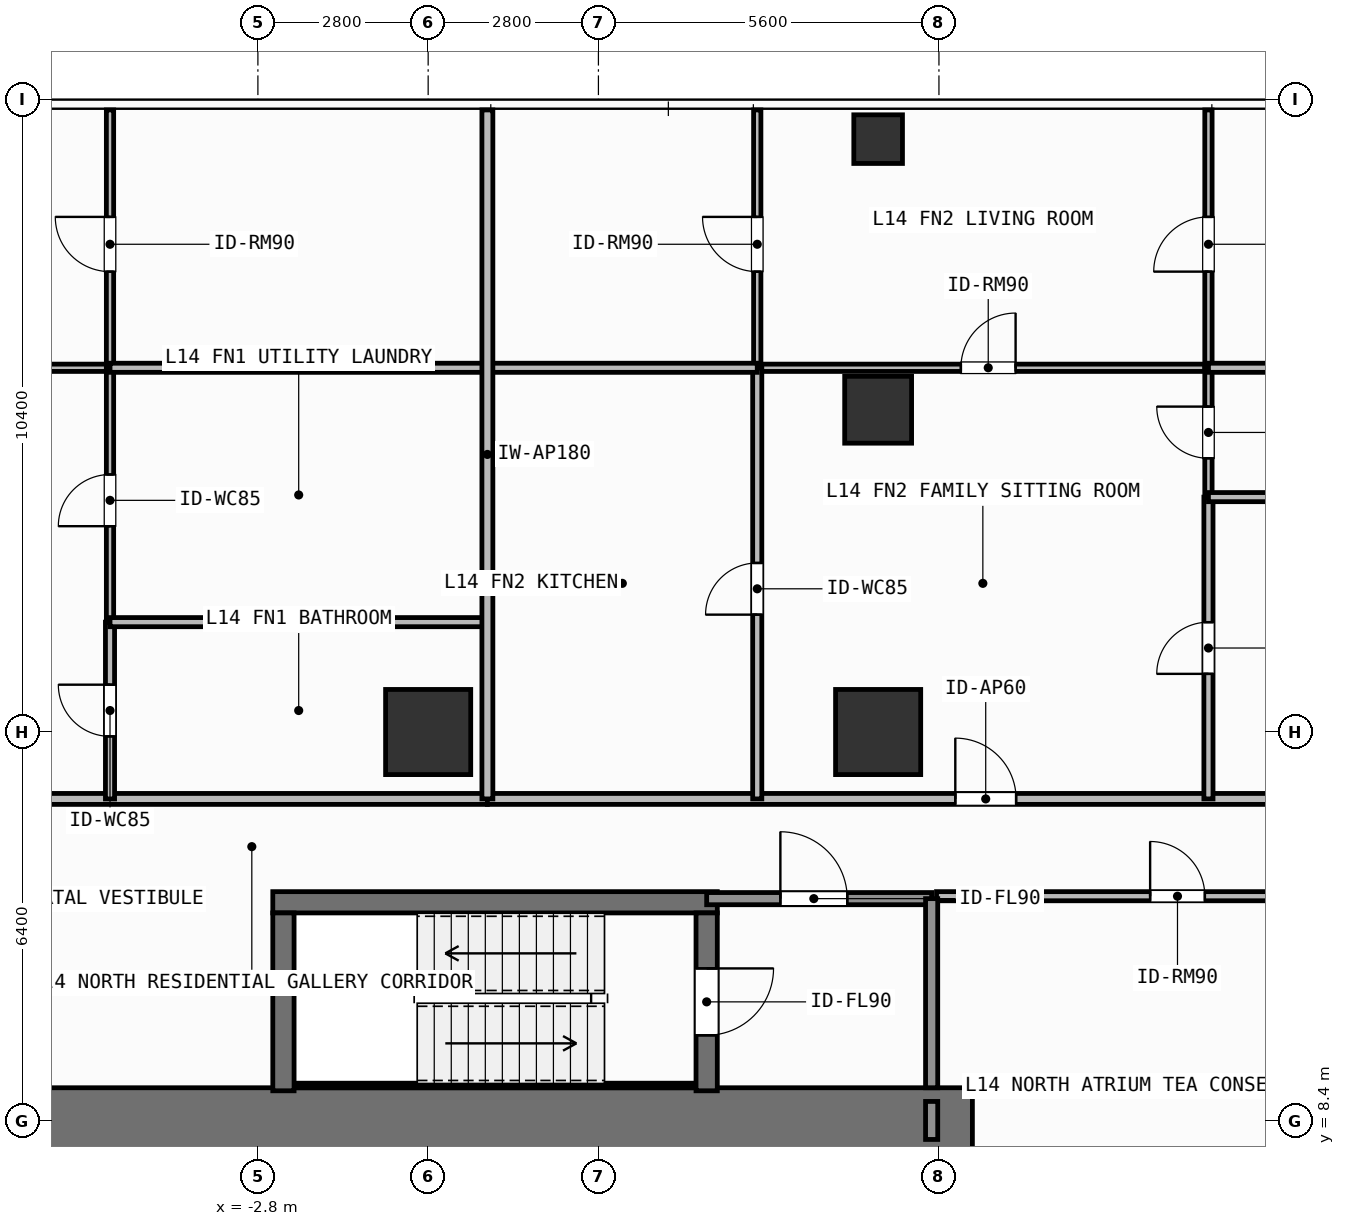
"""IFC4 building model, lengths in metres.
Left out: names, types, materials, properties, quantities, classifications, styles, units other than length and angle.
Written with IfcOpenShell. Run it as: python <this file> out.ifc"""

import sys

from ifc_helpers import new_model, si_unit, direction, frame, frame_2d, origin, origin_2d, place, context, subcontext, project, spatial, rectangle, hollow_rectangle, extrude, element, fill, save


model = new_model("IFC4")
c1 = context("Model", 3, precision=1e-05, world=origin(), true_north=direction((0.0, 1.0)))
c2 = subcontext(c1, "Body", "Model", "MODEL_VIEW")
j1 = project(units=[si_unit("LENGTHUNIT", "METRE"), si_unit("PLANEANGLEUNIT", "RADIAN")], contexts=[c1])
p1 = place(None, origin())
s1 = spatial("IfcSite", under=j1, at=p1, CompositionType="ELEMENT")
p2 = place(p1, origin())
s2 = spatial("IfcBuilding", under=s1, at=p2, CompositionType="ELEMENT")
p3 = place(p2, frame((0.0, 0.0, 54.0)))
s3 = spatial("IfcBuildingStorey", under=s2, at=p3, CompositionType="ELEMENT", Elevation=54.0)
p4 = place(p3, frame((-7.55, 8.4, 0.0), z_axis=(0.0, 0.0, 1.0), x_axis=(1.0, 0.0, 0.0)))
e1 = element("IfcWall", 1, at=p4, inside=s3, PredefinedType="SHEAR", context=c2, shape_type="SweptSolid", body=[
    extrude(rectangle(XDim=16.5, YDim=1.1, at=frame_2d((8.25, 0.0))), origin(), (0.0, 0.0, 1.0), 3.9),
])
p5 = place(p3, frame((-2.555, 12.0, 0.0), z_axis=(0.0, 0.0, 1.0), x_axis=(1.0, 0.0, 0.0)))
e2 = element("IfcWall", 2, at=p5, inside=s3, PredefinedType="SHEAR", context=c2, shape_type="SweptSolid", body=[
    extrude(rectangle(XDim=7.31, YDim=0.35, at=frame_2d((3.655, 0.0))), origin(), (0.0, 0.0, 1.0), 3.9),
])
p6 = place(p3, frame((-2.2, 8.988, 0.0), z_axis=(0.0, 0.0, 1.0), x_axis=(1.0, 0.0, 0.0)))
e3 = element("IfcWall", 3, at=p6, inside=s3, PredefinedType="SHEAR", context=c2, shape_type="SweptSolid", body=[
    extrude(rectangle(XDim=6.6, YDim=0.075, at=frame_2d((3.3, 0.0))), origin(), (0.0, 0.0, 1.0), 3.9),
])
p7 = place(p3, frame((-2.38, 8.9, 0.0), z_axis=(0.0, 0.0, 1.0), x_axis=(0.0, 1.0, 0.0)))
e4 = element("IfcWall", 4, at=p7, inside=s3, PredefinedType="SHEAR", context=c2, shape_type="SweptSolid", body=[
    extrude(rectangle(XDim=2.925, YDim=0.35, at=frame_2d((1.462, 0.0))), origin(), (0.0, 0.0, 1.0), 3.9),
])
p8 = place(p3, frame((4.58, 11.825, 0.0), z_axis=(0.0, 0.0, 1.0), x_axis=(0.0, -1.0, 0.0)))
e5 = element("IfcWall", 5, at=p8, inside=s3, PredefinedType="SHEAR", context=c2, shape_type="SweptSolid", body=[
    extrude(rectangle(XDim=2.925, YDim=0.35, at=frame_2d((1.462, 0.0))), origin(), (0.0, 0.0, 1.0), 3.9),
])
p9 = place(p8, frame((0.913, 0.0, 0.0)))
e6 = element("IfcOpeningElement", 6, at=p9, cuts=e5, PredefinedType="OPENING", context=c2, shape_type="SweptSolid", body=[
    extrude(rectangle(XDim=1.1, YDim=2.15, at=frame_2d((0.55, 1.075))), frame((0.0, 0.185, 0.0), z_axis=(0.0, -1.0, 0.0), x_axis=(1.0, 0.0, 0.0)), (0.0, 0.0, 1.0), 0.37),
])
for number, where, z_axis, x_axis in (
    (7, (0.0, 14.8, 0.0), (0.0, 0.0, 1.0), (1.0, 0.0, 0.0)),
    (8, (7.4, 14.8, 0.0), (0.0, 0.0, 1.0), (1.0, 0.0, 0.0)),
):
    element("IfcColumn", number, at=place(p3, frame(where, z_axis=z_axis, x_axis=x_axis)), inside=s3, PredefinedType="COLUMN", context=c2, shape_type="SweptSolid", body=[
        extrude(rectangle(XDim=1.4, YDim=1.4, at=origin_2d()), origin(), (0.0, 0.0, 1.0), 3.9),
    ])
p10 = place(p3, frame((7.4, 20.1, 0.0), z_axis=(0.0, 0.0, 1.0), x_axis=(1.0, 0.0, 0.0)))
e9 = element("IfcColumn", 9, at=p10, inside=s3, PredefinedType="COLUMN", context=c2, shape_type="SweptSolid", body=[
    extrude(rectangle(XDim=1.1, YDim=1.1, at=origin_2d()), origin(), (0.0, 0.0, 1.0), 3.9),
])
p11 = place(p3, frame((7.4, 24.55, 0.0), z_axis=(0.0, 0.0, 1.0), x_axis=(1.0, 0.0, 0.0)))
e10 = element("IfcColumn", 10, at=p11, inside=s3, PredefinedType="COLUMN", context=c2, shape_type="SweptSolid", body=[
    extrude(hollow_rectangle(XDim=0.8, YDim=0.8, WallThickness=0.036, at=origin_2d()), origin(), (0.0, 0.0, 1.0), 3.9),
])
p12 = place(p3, frame((4.58, 12.06, 0.0), z_axis=(0.0, 0.0, 1.0), x_axis=(1.0, 0.0, 0.0)))
e11 = element("IfcWall", 11, at=p12, inside=s3, PredefinedType="SOLIDWALL", context=c2, shape_type="SweptSolid", body=[
    extrude(rectangle(XDim=3.7, YDim=0.2, at=frame_2d((1.85, 0.0))), origin(), (0.0, 0.0, 1.0), 3.68),
])
p13 = place(p12, frame((1.212, 0.0, 0.0)))
e12 = element("IfcOpeningElement", 12, at=p13, cuts=e11, PredefinedType="OPENING", context=c2, shape_type="SweptSolid", body=[
    extrude(rectangle(XDim=1.1, YDim=2.15, at=frame_2d((0.55, 1.075))), frame((0.0, 0.11, 0.0), z_axis=(0.0, -1.0, 0.0), x_axis=(1.0, 0.0, 0.0)), (0.0, 0.0, 1.0), 0.22),
])
p14 = place(p3, frame((8.36, 12.1, 0.0), z_axis=(0.0, 0.0, 1.0), x_axis=(1.0, 0.0, 0.0)))
e13 = element("IfcWall", 13, at=p14, inside=s3, PredefinedType="PARTITIONING", context=c2, shape_type="SweptSolid", body=[
    extrude(rectangle(XDim=7.22, YDim=0.15, at=frame_2d((3.61, 0.0))), origin(), (0.0, 0.0, 1.0), 3.68),
])
p15 = place(p14, frame((3.513, 0.0, 0.0)))
e14 = element("IfcOpeningElement", 14, at=p15, cuts=e13, PredefinedType="OPENING", context=c2, shape_type="SweptSolid", body=[
    extrude(rectangle(XDim=0.9, YDim=2.1, at=frame_2d((0.45, 1.05))), frame((0.0, 0.085, 0.0), z_axis=(0.0, -1.0, 0.0), x_axis=(1.0, 0.0, 0.0)), (0.0, 0.0, 1.0), 0.17),
])
p16 = place(p3, frame((-24.42, 13.7, 0.0), z_axis=(0.0, 0.0, 1.0), x_axis=(1.0, 0.0, 0.0)))
e15 = element("IfcWall", 15, at=p16, inside=s3, PredefinedType="PARTITIONING", context=c2, shape_type="SweptSolid", body=[
    extrude(rectangle(XDim=25.394, YDim=0.18, at=frame_2d((12.697, 0.0))), origin(), (0.0, 0.0, 1.0), 3.68),
])
p17 = place(p16, frame((10.4, 0.0, 0.0)))
e16 = element("IfcOpeningElement", 16, at=p17, cuts=e15, PredefinedType="OPENING", context=c2, shape_type="SweptSolid", body=[
    extrude(rectangle(XDim=1.0, YDim=2.2, at=frame_2d((0.5, 1.1))), frame((0.0, 0.1, 0.0), z_axis=(0.0, -1.0, 0.0), x_axis=(1.0, 0.0, 0.0)), (0.0, 0.0, 1.0), 0.2),
])
p18 = place(p3, frame((-12.805, 20.79, 0.0), z_axis=(0.0, 0.0, 1.0), x_axis=(1.0, 0.0, 0.0)))
e17 = element("IfcWall", 17, at=p18, inside=s3, PredefinedType="PARTITIONING", context=c2, shape_type="SweptSolid", body=[
    extrude(rectangle(XDim=7.573, YDim=0.12, at=frame_2d((3.787, 0.0))), origin(), (0.0, 0.0, 1.0), 3.68),
])
p19 = place(p18, frame((3.336, 0.0, 0.0)))
e18 = element("IfcOpeningElement", 18, at=p19, cuts=e17, PredefinedType="OPENING", context=c2, shape_type="SweptSolid", body=[
    extrude(rectangle(XDim=0.9, YDim=2.1, at=frame_2d((0.45, 1.05))), frame((0.0, 0.07, 0.0), z_axis=(0.0, -1.0, 0.0), x_axis=(1.0, 0.0, 0.0)), (0.0, 0.0, 1.0), 0.14),
])
p20 = place(p3, frame((-5.232, 13.7, 0.0), z_axis=(0.0, 0.0, 1.0), x_axis=(0.0, 1.0, 0.0)))
e19 = element("IfcWall", 19, at=p20, inside=s3, PredefinedType="PARTITIONING", context=c2, shape_type="SweptSolid", body=[
    extrude(rectangle(XDim=2.907, YDim=0.15, at=frame_2d((1.454, 0.0))), origin(), (0.0, 0.0, 1.0), 3.68),
])
p21 = place(p20, frame((1.029, 0.0, 0.0)))
e20 = element("IfcOpeningElement", 20, at=p21, cuts=e19, PredefinedType="OPENING", context=c2, shape_type="SweptSolid", body=[
    extrude(rectangle(XDim=0.85, YDim=2.1, at=frame_2d((0.425, 1.05))), frame((0.0, 0.085, 0.0), z_axis=(0.0, -1.0, 0.0), x_axis=(1.0, 0.0, 0.0)), (0.0, 0.0, 1.0), 0.17),
])
p22 = place(p3, frame((-5.232, 16.607, 0.0), z_axis=(0.0, 0.0, 1.0), x_axis=(0.0, 1.0, 0.0)))
e21 = element("IfcWall", 21, at=p22, inside=s3, PredefinedType="PARTITIONING", context=c2, shape_type="SweptSolid", body=[
    extrude(rectangle(XDim=4.183, YDim=0.12, at=frame_2d((2.092, 0.0))), origin(), (0.0, 0.0, 1.0), 3.68),
])
p23 = place(p22, frame((1.578, 0.0, 0.0)))
e22 = element("IfcOpeningElement", 22, at=p23, cuts=e21, PredefinedType="OPENING", context=c2, shape_type="SweptSolid", body=[
    extrude(rectangle(XDim=0.85, YDim=2.1, at=frame_2d((0.425, 1.05))), frame((0.0, 0.07, 0.0), z_axis=(0.0, -1.0, 0.0), x_axis=(1.0, 0.0, 0.0)), (0.0, 0.0, 1.0), 0.14),
])
p24 = place(p3, frame((-5.232, 20.79, 0.0), z_axis=(0.0, 0.0, 1.0), x_axis=(0.0, 1.0, 0.0)))
e23 = element("IfcWall", 23, at=p24, inside=s3, PredefinedType="PARTITIONING", context=c2, shape_type="SweptSolid", body=[
    extrude(rectangle(XDim=4.24, YDim=0.12, at=frame_2d((2.12, 0.0))), origin(), (0.0, 0.0, 1.0), 3.68),
])
p25 = place(p24, frame((1.581, 0.0, 0.0)))
e24 = element("IfcOpeningElement", 24, at=p25, cuts=e23, PredefinedType="OPENING", context=c2, shape_type="SweptSolid", body=[
    extrude(rectangle(XDim=0.9, YDim=2.1, at=frame_2d((0.45, 1.05))), frame((0.0, 0.07, 0.0), z_axis=(0.0, -1.0, 0.0), x_axis=(1.0, 0.0, 0.0)), (0.0, 0.0, 1.0), 0.14),
])
p26 = place(p3, frame((0.974, 13.7, 0.0), z_axis=(0.0, 0.0, 1.0), x_axis=(1.0, 0.0, 0.0)))
e25 = element("IfcWall", 25, at=p26, inside=s3, PredefinedType="PARTITIONING", context=c2, shape_type="SweptSolid", body=[
    extrude(rectangle(XDim=17.646, YDim=0.18, at=frame_2d((8.823, 0.0))), origin(), (0.0, 0.0, 1.0), 3.68),
])
p27 = place(p26, frame((7.695, 0.0, 0.0)))
e26 = element("IfcOpeningElement", 26, at=p27, cuts=e25, PredefinedType="OPENING", context=c2, shape_type="SweptSolid", body=[
    extrude(rectangle(XDim=1.0, YDim=2.2, at=frame_2d((0.5, 1.1))), frame((0.0, 0.1, 0.0), z_axis=(0.0, -1.0, 0.0), x_axis=(1.0, 0.0, 0.0)), (0.0, 0.0, 1.0), 0.2),
])
p28 = place(p3, frame((5.412, 20.79, 0.0), z_axis=(0.0, 0.0, 1.0), x_axis=(1.0, 0.0, 0.0)))
e27 = element("IfcWall", 27, at=p28, inside=s3, PredefinedType="PARTITIONING", context=c2, shape_type="SweptSolid", body=[
    extrude(rectangle(XDim=7.42, YDim=0.12, at=frame_2d((3.71, 0.0))), origin(), (0.0, 0.0, 1.0), 3.68),
])
p29 = place(p28, frame((3.349, 0.0, 0.0)))
e28 = element("IfcOpeningElement", 28, at=p29, cuts=e27, PredefinedType="OPENING", context=c2, shape_type="SweptSolid", body=[
    extrude(rectangle(XDim=0.9, YDim=2.1, at=frame_2d((0.45, 1.05))), frame((0.0, 0.07, 0.0), z_axis=(0.0, -1.0, 0.0), x_axis=(1.0, 0.0, 0.0)), (0.0, 0.0, 1.0), 0.14),
])
p30 = place(p3, frame((5.412, 13.7, 0.0), z_axis=(0.0, 0.0, 1.0), x_axis=(0.0, 1.0, 0.0)))
e29 = element("IfcWall", 29, at=p30, inside=s3, PredefinedType="PARTITIONING", context=c2, shape_type="SweptSolid", body=[
    extrude(rectangle(XDim=7.09, YDim=0.15, at=frame_2d((3.545, 0.0))), origin(), (0.0, 0.0, 1.0), 3.68),
])
p31 = place(p30, frame((3.03, 0.0, 0.0)))
e30 = element("IfcOpeningElement", 30, at=p31, cuts=e29, PredefinedType="OPENING", context=c2, shape_type="SweptSolid", body=[
    extrude(rectangle(XDim=0.85, YDim=2.1, at=frame_2d((0.425, 1.05))), frame((0.0, 0.085, 0.0), z_axis=(0.0, -1.0, 0.0), x_axis=(1.0, 0.0, 0.0)), (0.0, 0.0, 1.0), 0.17),
])
p32 = place(p3, frame((5.412, 20.79, 0.0), z_axis=(0.0, 0.0, 1.0), x_axis=(0.0, 1.0, 0.0)))
e31 = element("IfcWall", 31, at=p32, inside=s3, PredefinedType="PARTITIONING", context=c2, shape_type="SweptSolid", body=[
    extrude(rectangle(XDim=4.24, YDim=0.12, at=frame_2d((2.12, 0.0))), origin(), (0.0, 0.0, 1.0), 3.68),
])
p33 = place(p32, frame((1.581, 0.0, 0.0)))
e32 = element("IfcOpeningElement", 32, at=p33, cuts=e31, PredefinedType="OPENING", context=c2, shape_type="SweptSolid", body=[
    extrude(rectangle(XDim=0.9, YDim=2.1, at=frame_2d((0.45, 1.05))), frame((0.0, 0.07, 0.0), z_axis=(0.0, -1.0, 0.0), x_axis=(1.0, 0.0, 0.0)), (0.0, 0.0, 1.0), 0.14),
])
p34 = place(p3, frame((12.832, 13.7, 0.0), z_axis=(0.0, 0.0, 1.0), x_axis=(0.0, 1.0, 0.0)))
e33 = element("IfcWall", 33, at=p34, inside=s3, PredefinedType="PARTITIONING", context=c2, shape_type="SweptSolid", body=[
    extrude(rectangle(XDim=4.963, YDim=0.15, at=frame_2d((2.481, 0.0))), origin(), (0.0, 0.0, 1.0), 3.68),
])
p35 = place(p34, frame((2.056, 0.0, 0.0)))
e34 = element("IfcOpeningElement", 34, at=p35, cuts=e33, PredefinedType="OPENING", context=c2, shape_type="SweptSolid", body=[
    extrude(rectangle(XDim=0.85, YDim=2.1, at=frame_2d((0.425, 1.05))), frame((0.0, 0.085, 0.0), z_axis=(0.0, -1.0, 0.0), x_axis=(1.0, 0.0, 0.0)), (0.0, 0.0, 1.0), 0.17),
])
p36 = place(p3, frame((12.832, 18.663, 0.0), z_axis=(0.0, 0.0, 1.0), x_axis=(0.0, 1.0, 0.0)))
e35 = element("IfcWall", 35, at=p36, inside=s3, PredefinedType="PARTITIONING", context=c2, shape_type="SweptSolid", body=[
    extrude(rectangle(XDim=2.127, YDim=0.12, at=frame_2d((1.063, 0.0))), origin(), (0.0, 0.0, 1.0), 3.68),
])
p37 = place(p36, frame((0.638, 0.0, 0.0)))
e36 = element("IfcOpeningElement", 36, at=p37, cuts=e35, PredefinedType="OPENING", context=c2, shape_type="SweptSolid", body=[
    extrude(rectangle(XDim=0.85, YDim=2.1, at=frame_2d((0.425, 1.05))), frame((0.0, 0.07, 0.0), z_axis=(0.0, -1.0, 0.0), x_axis=(1.0, 0.0, 0.0)), (0.0, 0.0, 1.0), 0.14),
])
p38 = place(p3, frame((12.832, 20.79, 0.0), z_axis=(0.0, 0.0, 1.0), x_axis=(0.0, 1.0, 0.0)))
e37 = element("IfcWall", 37, at=p38, inside=s3, PredefinedType="PARTITIONING", context=c2, shape_type="SweptSolid", body=[
    extrude(rectangle(XDim=4.24, YDim=0.12, at=frame_2d((2.12, 0.0))), origin(), (0.0, 0.0, 1.0), 3.68),
])
p39 = place(p38, frame((1.581, 0.0, 0.0)))
e38 = element("IfcOpeningElement", 38, at=p39, cuts=e37, PredefinedType="OPENING", context=c2, shape_type="SweptSolid", body=[
    extrude(rectangle(XDim=0.9, YDim=2.1, at=frame_2d((0.45, 1.05))), frame((0.0, 0.07, 0.0), z_axis=(0.0, -1.0, 0.0), x_axis=(1.0, 0.0, 0.0)), (0.0, 0.0, 1.0), 0.14),
])
p40 = place(p3, frame((8.28, 8.95, 0.0), z_axis=(0.0, 0.0, 1.0), x_axis=(0.0, 1.0, 0.0)))
e39 = element("IfcWall", 39, at=p40, inside=s3, PredefinedType="SOLIDWALL", context=c2, shape_type="SweptSolid", body=[
    extrude(rectangle(XDim=3.11, YDim=0.2, at=frame_2d((1.555, 0.0))), origin(), (0.0, 0.0, 1.0), 3.68),
])
p41 = place(p3, frame((8.28, 8.1, 0.0), z_axis=(0.0, 0.0, 1.0), x_axis=(0.0, 1.0, 0.0)))
e40 = element("IfcWall", 40, at=p41, inside=s3, PredefinedType="SOLIDWALL", context=c2, shape_type="SweptSolid", body=[
    extrude(rectangle(XDim=0.625, YDim=0.2, at=frame_2d((0.312, 0.0))), origin(), (0.0, 0.0, 1.0), 3.68),
])
for number, where, z_axis, x_axis in (
    (41, (-5.232, 16.607, 0.0), (0.0, 0.0, 1.0), (1.0, 0.0, 0.0)),
    (42, (-5.232, 20.79, 0.0), (0.0, 0.0, 1.0), (1.0, 0.0, 0.0)),
):
    element("IfcWall", number, at=place(p3, frame(where, z_axis=z_axis, x_axis=x_axis)), inside=s3, PredefinedType="PARTITIONING", context=c2, shape_type="SweptSolid", body=[
        extrude(rectangle(XDim=6.206, YDim=0.15, at=frame_2d((3.103, 0.0))), origin(), (0.0, 0.0, 1.0), 3.68),
    ])
p42 = place(p3, frame((0.974, 20.79, 0.0), z_axis=(0.0, 0.0, 1.0), x_axis=(1.0, 0.0, 0.0)))
e43 = element("IfcWall", 43, at=p42, inside=s3, PredefinedType="PARTITIONING", context=c2, shape_type="SweptSolid", body=[
    extrude(rectangle(XDim=4.438, YDim=0.15, at=frame_2d((2.219, 0.0))), origin(), (0.0, 0.0, 1.0), 3.68),
])
for number, where, z_axis, x_axis in (
    (44, (12.832, 18.663, 0.0), (0.0, 0.0, 1.0), (1.0, 0.0, 0.0)),
    (45, (12.832, 20.79, 0.0), (0.0, 0.0, 1.0), (1.0, 0.0, 0.0)),
):
    element("IfcWall", number, at=place(p3, frame(where, z_axis=z_axis, x_axis=x_axis)), inside=s3, PredefinedType="PARTITIONING", context=c2, shape_type="SweptSolid", body=[
        extrude(rectangle(XDim=5.788, YDim=0.15, at=frame_2d((2.894, 0.0))), origin(), (0.0, 0.0, 1.0), 3.68),
    ])
p43 = place(p3, frame((0.974, 13.7, 0.0), z_axis=(0.0, 0.0, 1.0), x_axis=(0.0, 1.0, 0.0)))
e46 = element("IfcWall", 46, at=p43, inside=s3, PredefinedType="PARTITIONING", context=c2, shape_type="SweptSolid", body=[
    extrude(rectangle(XDim=11.33, YDim=0.18, at=frame_2d((5.665, 0.0))), origin(), (0.0, 0.0, 1.0), 3.68),
])
p44 = place(p9, origin())
e47 = element("IfcDoor", 47, at=p44, inside=s3, OperationType="SINGLE_SWING_LEFT", PredefinedType="DOOR", context=c2, shape_type="SweptSolid", body=[
    extrude(rectangle(XDim=1.1, YDim=2.15, at=frame_2d((0.55, 1.075))), frame((0.0, 0.025, 0.0), z_axis=(0.0, -1.0, 0.0), x_axis=(1.0, 0.0, 0.0)), (0.0, 0.0, 1.0), 0.05),
])
fill(e6, e47)
p45 = place(p13, origin())
e48 = element("IfcDoor", 48, at=p45, inside=s3, OperationType="SINGLE_SWING_LEFT", PredefinedType="DOOR", context=c2, shape_type="SweptSolid", body=[
    extrude(rectangle(XDim=1.1, YDim=2.15, at=frame_2d((0.55, 1.075))), frame((0.0, 0.025, 0.0), z_axis=(0.0, -1.0, 0.0), x_axis=(1.0, 0.0, 0.0)), (0.0, 0.0, 1.0), 0.05),
])
fill(e12, e48)
p46 = place(p15, origin())
e49 = element("IfcDoor", 49, at=p46, inside=s3, OperationType="SINGLE_SWING_LEFT", PredefinedType="DOOR", context=c2, shape_type="SweptSolid", body=[
    extrude(rectangle(XDim=0.9, YDim=2.1, at=frame_2d((0.45, 1.05))), frame((0.0, 0.025, 0.0), z_axis=(0.0, -1.0, 0.0), x_axis=(1.0, 0.0, 0.0)), (0.0, 0.0, 1.0), 0.05),
])
fill(e14, e49)
p47 = place(p21, origin())
e50 = element("IfcDoor", 50, at=p47, inside=s3, OperationType="SINGLE_SWING_RIGHT", PredefinedType="DOOR", context=c2, shape_type="SweptSolid", body=[
    extrude(rectangle(XDim=0.85, YDim=2.1, at=frame_2d((0.425, 1.05))), frame((0.0, 0.025, 0.0), z_axis=(0.0, -1.0, 0.0), x_axis=(1.0, 0.0, 0.0)), (0.0, 0.0, 1.0), 0.05),
])
fill(e20, e50)
p48 = place(p23, origin())
e51 = element("IfcDoor", 51, at=p48, inside=s3, OperationType="SINGLE_SWING_LEFT", PredefinedType="DOOR", context=c2, shape_type="SweptSolid", body=[
    extrude(rectangle(XDim=0.85, YDim=2.1, at=frame_2d((0.425, 1.05))), frame((0.0, 0.025, 0.0), z_axis=(0.0, -1.0, 0.0), x_axis=(1.0, 0.0, 0.0)), (0.0, 0.0, 1.0), 0.05),
])
fill(e22, e51)
p49 = place(p25, origin())
e52 = element("IfcDoor", 52, at=p49, inside=s3, OperationType="SINGLE_SWING_RIGHT", PredefinedType="DOOR", context=c2, shape_type="SweptSolid", body=[
    extrude(rectangle(XDim=0.9, YDim=2.1, at=frame_2d((0.45, 1.05))), frame((0.0, 0.025, 0.0), z_axis=(0.0, -1.0, 0.0), x_axis=(1.0, 0.0, 0.0)), (0.0, 0.0, 1.0), 0.05),
])
fill(e24, e52)
p50 = place(p27, origin())
e53 = element("IfcDoor", 53, at=p50, inside=s3, OperationType="SINGLE_SWING_LEFT", PredefinedType="DOOR", context=c2, shape_type="SweptSolid", body=[
    extrude(rectangle(XDim=1.0, YDim=2.2, at=frame_2d((0.5, 1.1))), frame((0.0, 0.025, 0.0), z_axis=(0.0, -1.0, 0.0), x_axis=(1.0, 0.0, 0.0)), (0.0, 0.0, 1.0), 0.05),
])
fill(e26, e53)
p51 = place(p29, origin())
e54 = element("IfcDoor", 54, at=p51, inside=s3, OperationType="SINGLE_SWING_RIGHT", PredefinedType="DOOR", context=c2, shape_type="SweptSolid", body=[
    extrude(rectangle(XDim=0.9, YDim=2.1, at=frame_2d((0.45, 1.05))), frame((0.0, 0.025, 0.0), z_axis=(0.0, -1.0, 0.0), x_axis=(1.0, 0.0, 0.0)), (0.0, 0.0, 1.0), 0.05),
])
fill(e28, e54)
p52 = place(p31, origin())
e55 = element("IfcDoor", 55, at=p52, inside=s3, OperationType="SINGLE_SWING_LEFT", PredefinedType="DOOR", context=c2, shape_type="SweptSolid", body=[
    extrude(rectangle(XDim=0.85, YDim=2.1, at=frame_2d((0.425, 1.05))), frame((0.0, 0.025, 0.0), z_axis=(0.0, -1.0, 0.0), x_axis=(1.0, 0.0, 0.0)), (0.0, 0.0, 1.0), 0.05),
])
fill(e30, e55)
p53 = place(p33, origin())
e56 = element("IfcDoor", 56, at=p53, inside=s3, OperationType="SINGLE_SWING_RIGHT", PredefinedType="DOOR", context=c2, shape_type="SweptSolid", body=[
    extrude(rectangle(XDim=0.9, YDim=2.1, at=frame_2d((0.45, 1.05))), frame((0.0, 0.025, 0.0), z_axis=(0.0, -1.0, 0.0), x_axis=(1.0, 0.0, 0.0)), (0.0, 0.0, 1.0), 0.05),
])
fill(e32, e56)
p54 = place(p35, origin())
e57 = element("IfcDoor", 57, at=p54, inside=s3, OperationType="SINGLE_SWING_LEFT", PredefinedType="DOOR", context=c2, shape_type="SweptSolid", body=[
    extrude(rectangle(XDim=0.85, YDim=2.1, at=frame_2d((0.425, 1.05))), frame((0.0, 0.025, 0.0), z_axis=(0.0, -1.0, 0.0), x_axis=(1.0, 0.0, 0.0)), (0.0, 0.0, 1.0), 0.05),
])
fill(e34, e57)
p55 = place(p37, origin())
e58 = element("IfcDoor", 58, at=p55, inside=s3, OperationType="SINGLE_SWING_RIGHT", PredefinedType="DOOR", context=c2, shape_type="SweptSolid", body=[
    extrude(rectangle(XDim=0.85, YDim=2.1, at=frame_2d((0.425, 1.05))), frame((0.0, 0.025, 0.0), z_axis=(0.0, -1.0, 0.0), x_axis=(1.0, 0.0, 0.0)), (0.0, 0.0, 1.0), 0.05),
])
fill(e36, e58)
p56 = place(p39, origin())
e59 = element("IfcDoor", 59, at=p56, inside=s3, OperationType="SINGLE_SWING_LEFT", PredefinedType="DOOR", context=c2, shape_type="SweptSolid", body=[
    extrude(rectangle(XDim=0.9, YDim=2.1, at=frame_2d((0.45, 1.05))), frame((0.0, 0.025, 0.0), z_axis=(0.0, -1.0, 0.0), x_axis=(1.0, 0.0, 0.0)), (0.0, 0.0, 1.0), 0.05),
])
fill(e38, e59)
save(model, sys.argv[1])
